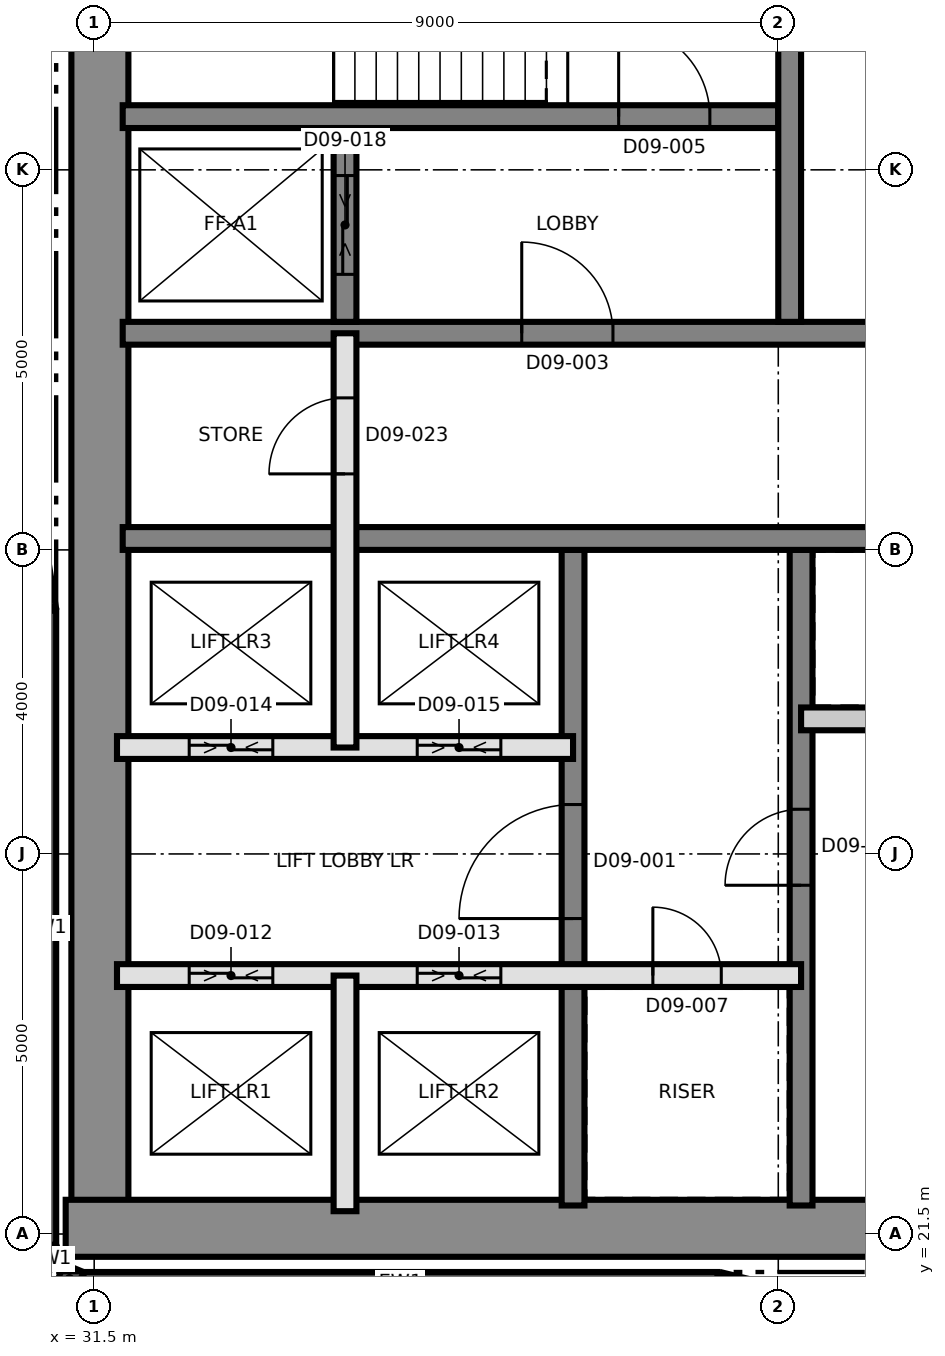
"""IFC4 building model, lengths in metres.
Left out: names, types, materials, properties, quantities, classifications, styles, units other than length and angle.
Written with IfcOpenShell. Run it as: python <this file> out.ifc"""

import sys

from ifc_helpers import new_model, si_unit, direction, frame, frame_2d, origin, place, context, subcontext, project, spatial, rectangle, extrude, element, fill, save


model = new_model("IFC4")
c1 = context("Model", 3, precision=1e-05, world=origin(), true_north=direction((0.0, 1.0)))
c2 = subcontext(c1, "Body", "Model", "MODEL_VIEW")
j1 = project(units=[si_unit("LENGTHUNIT", "METRE"), si_unit("PLANEANGLEUNIT", "RADIAN")], contexts=[c1])
p1 = place(None, origin())
s1 = spatial("IfcSite", under=j1, at=p1, CompositionType="ELEMENT")
p2 = place(p1, origin())
s2 = spatial("IfcBuilding", under=s1, at=p2, CompositionType="ELEMENT")
p3 = place(p2, frame((0.0, 0.0, 113.0)))
s3 = spatial("IfcBuildingStorey", under=s2, at=p3, CompositionType="ELEMENT", Elevation=113.0)
p4 = place(p3, frame((31.575, 21.875, 0.0), z_axis=(0.0, 0.0, 1.0), x_axis=(0.0, 1.0, 0.0)))
e1 = element("IfcWall", 1, at=p4, inside=s3, PredefinedType="SHEAR", context=c2, shape_type="SweptSolid", body=[
    extrude(rectangle(XDim=17.25, YDim=0.75, at=frame_2d((8.625, 0.0))), origin(), (0.0, 0.0, 1.0), 3.7),
])
p5 = place(p3, frame((31.125, 21.575, 0.0), z_axis=(0.0, 0.0, 1.0), x_axis=(1.0, 0.0, 0.0)))
e2 = element("IfcWall", 2, at=p5, inside=s3, PredefinedType="SHEAR", context=c2, shape_type="SweptSolid", body=[
    extrude(rectangle(XDim=27.0, YDim=0.75, at=frame_2d((13.5, 0.0))), origin(), (0.0, 0.0, 1.0), 3.7),
])
p6 = place(p3, frame((37.8, 21.875, 0.0), z_axis=(0.0, 0.0, 1.0), x_axis=(0.0, 1.0, 0.0)))
e3 = element("IfcWall", 3, at=p6, inside=s3, PredefinedType="SHEAR", context=c2, shape_type="SweptSolid", body=[
    extrude(rectangle(XDim=8.625, YDim=0.3, at=frame_2d((4.312, 0.0))), origin(), (0.0, 0.0, 1.0), 3.7),
])
p7 = place(p6, frame((3.775, 0.0, 0.0)))
e4 = element("IfcOpeningElement", 4, at=p7, cuts=e3, PredefinedType="OPENING", context=c2, shape_type="SweptSolid", body=[
    extrude(rectangle(XDim=1.5, YDim=2.1, at=frame_2d((0.75, 1.05))), frame((0.0, 0.16, 0.0), z_axis=(0.0, -1.0, 0.0), x_axis=(1.0, 0.0, 0.0)), (0.0, 0.0, 1.0), 0.32),
])
p8 = place(p3, frame((40.8, 21.875, 0.0), z_axis=(0.0, 0.0, 1.0), x_axis=(0.0, 1.0, 0.0)))
e5 = element("IfcWall", 5, at=p8, inside=s3, PredefinedType="SHEAR", context=c2, shape_type="SweptSolid", body=[
    extrude(rectangle(XDim=8.625, YDim=0.3, at=frame_2d((4.312, 0.0))), origin(), (0.0, 0.0, 1.0), 3.7),
])
p9 = place(p8, frame((4.213, 0.0, 0.0)))
e6 = element("IfcOpeningElement", 6, at=p9, cuts=e5, PredefinedType="OPENING", context=c2, shape_type="SweptSolid", body=[
    extrude(rectangle(XDim=1.0, YDim=2.1, at=frame_2d((0.5, 1.05))), frame((0.0, 0.16, 0.0), z_axis=(0.0, -1.0, 0.0), x_axis=(1.0, 0.0, 0.0)), (0.0, 0.0, 1.0), 0.32),
])
p10 = place(p3, frame((31.875, 30.65, 0.0), z_axis=(0.0, 0.0, 1.0), x_axis=(1.0, 0.0, 0.0)))
e7 = element("IfcWall", 7, at=p10, inside=s3, PredefinedType="SHEAR", context=c2, shape_type="SweptSolid", body=[
    extrude(rectangle(XDim=26.25, YDim=0.3, at=frame_2d((13.125, 0.0))), origin(), (0.0, 0.0, 1.0), 3.7),
])
p11 = place(p10, frame((24.625, 0.0, 0.0)))
e8 = element("IfcOpeningElement", 8, at=p11, cuts=e7, PredefinedType="OPENING", context=c2, shape_type="SweptSolid", body=[
    extrude(rectangle(XDim=1.0, YDim=2.1, at=frame_2d((0.5, 1.05))), frame((0.0, 0.16, 0.0), z_axis=(0.0, -1.0, 0.0), x_axis=(1.0, 0.0, 0.0)), (0.0, 0.0, 1.0), 0.32),
])
p12 = place(p10, frame((11.425, 0.0, 0.0)))
e9 = element("IfcOpeningElement", 9, at=p12, cuts=e7, PredefinedType="OPENING", context=c2, shape_type="SweptSolid", body=[
    extrude(rectangle(XDim=1.0, YDim=2.1, at=frame_2d((0.5, 1.05))), frame((0.0, 0.16, 0.0), z_axis=(0.0, -1.0, 0.0), x_axis=(1.0, 0.0, 0.0)), (0.0, 0.0, 1.0), 0.32),
])
p13 = place(p3, frame((31.875, 33.35, 0.0), z_axis=(0.0, 0.0, 1.0), x_axis=(1.0, 0.0, 0.0)))
e10 = element("IfcWall", 10, at=p13, inside=s3, PredefinedType="SHEAR", context=c2, shape_type="SweptSolid", body=[
    extrude(rectangle(XDim=26.25, YDim=0.3, at=frame_2d((13.125, 0.0))), origin(), (0.0, 0.0, 1.0), 3.7),
])
p14 = place(p13, frame((13.775, 0.0, 0.0)))
e11 = element("IfcOpeningElement", 11, at=p14, cuts=e10, PredefinedType="OPENING", context=c2, shape_type="SweptSolid", body=[
    extrude(rectangle(XDim=1.4, YDim=2.1, at=frame_2d((0.7, 1.05))), frame((0.0, 0.16, 0.0), z_axis=(0.0, -1.0, 0.0), x_axis=(1.0, 0.0, 0.0)), (0.0, 0.0, 1.0), 0.32),
])
p15 = place(p13, frame((5.25, 0.0, 0.0)))
e12 = element("IfcOpeningElement", 12, at=p15, cuts=e10, PredefinedType="OPENING", context=c2, shape_type="SweptSolid", body=[
    extrude(rectangle(XDim=1.2, YDim=2.1, at=frame_2d((0.6, 1.05))), frame((0.0, 0.16, 0.0), z_axis=(0.0, -1.0, 0.0), x_axis=(1.0, 0.0, 0.0)), (0.0, 0.0, 1.0), 0.32),
])
p16 = place(p13, frame((19.8, 0.0, 0.0)))
e13 = element("IfcOpeningElement", 13, at=p16, cuts=e10, PredefinedType="OPENING", context=c2, shape_type="SweptSolid", body=[
    extrude(rectangle(XDim=1.2, YDim=2.1, at=frame_2d((0.6, 1.05))), frame((0.0, 0.16, 0.0), z_axis=(0.0, -1.0, 0.0), x_axis=(1.0, 0.0, 0.0)), (0.0, 0.0, 1.0), 0.32),
])
p17 = place(p3, frame((31.875, 36.2, 0.0), z_axis=(0.0, 0.0, 1.0), x_axis=(1.0, 0.0, 0.0)))
e14 = element("IfcWall", 14, at=p17, inside=s3, PredefinedType="SHEAR", context=c2, shape_type="SweptSolid", body=[
    extrude(rectangle(XDim=8.625, YDim=0.3, at=frame_2d((4.312, 0.0))), origin(), (0.0, 0.0, 1.0), 3.7),
])
p18 = place(p17, frame((6.525, 0.0, 0.0)))
e15 = element("IfcOpeningElement", 15, at=p18, cuts=e14, PredefinedType="OPENING", context=c2, shape_type="SweptSolid", body=[
    extrude(rectangle(XDim=1.2, YDim=2.1, at=frame_2d((0.6, 1.05))), frame((0.0, 0.16, 0.0), z_axis=(0.0, -1.0, 0.0), x_axis=(1.0, 0.0, 0.0)), (0.0, 0.0, 1.0), 0.32),
])
p19 = place(p3, frame((40.65, 33.5, 0.0), z_axis=(0.0, 0.0, 1.0), x_axis=(0.0, 1.0, 0.0)))
e16 = element("IfcWall", 16, at=p19, inside=s3, PredefinedType="SHEAR", context=c2, shape_type="SweptSolid", body=[
    extrude(rectangle(XDim=5.625, YDim=0.3, at=frame_2d((2.812, 0.0))), origin(), (0.0, 0.0, 1.0), 3.7),
])
p20 = place(p3, frame((34.8, 33.5, 0.0), z_axis=(0.0, 0.0, 1.0), x_axis=(0.0, 1.0, 0.0)))
e17 = element("IfcWall", 17, at=p20, inside=s3, PredefinedType="SHEAR", context=c2, shape_type="SweptSolid", body=[
    extrude(rectangle(XDim=2.55, YDim=0.3, at=frame_2d((1.275, 0.0))), origin(), (0.0, 0.0, 1.0), 3.7),
])
p21 = place(p20, frame((0.625, 0.0, 0.0)))
e18 = element("IfcOpeningElement", 18, at=p21, cuts=e17, PredefinedType="OPENING", context=c2, shape_type="SweptSolid", body=[
    extrude(rectangle(XDim=1.3, YDim=2.4, at=frame_2d((0.65, 1.2))), frame((0.0, 0.16, 0.0), z_axis=(0.0, -1.0, 0.0), x_axis=(1.0, 0.0, 0.0)), (0.0, 0.0, 1.0), 0.32),
])
p22 = place(p3, frame((30.85, 29.699, 0.0), z_axis=(0.0, 0.0, 1.0), x_axis=(0.0, -1.0, 0.0)))
e19 = element("IfcWall", 19, at=p22, inside=s3, PredefinedType="SOLIDWALL", context=c2, shape_type="SweptSolid", body=[
    extrude(rectangle(XDim=8.34, YDim=0.3, at=frame_2d((4.17, 0.0))), origin(), (0.0, 0.0, 1.0), 3.4),
])
for number, where, z_axis, x_axis in (
    (20, (30.861, 21.302, 0.0), (0.0, 0.0, 1.0), (0.383, -0.924, 0.0)),
    (21, (31.048, 20.967, 0.0), (0.0, 0.0, 1.0), (0.924, -0.383, 0.0)),
):
    element("IfcWall", number, at=place(p3, frame(where, z_axis=z_axis, x_axis=x_axis)), inside=s3, PredefinedType="SOLIDWALL", context=c2, shape_type="SweptSolid", body=[
        extrude(rectangle(XDim=0.275, YDim=0.3, at=frame_2d((0.138, 0.0))), origin(), (0.0, 0.0, 1.0), 3.4),
    ])
p23 = place(p3, frame((31.36, 20.85, 0.0), z_axis=(0.0, 0.0, 1.0), x_axis=(1.0, 0.0, 0.0)))
e22 = element("IfcWall", 22, at=p23, inside=s3, PredefinedType="SOLIDWALL", context=c2, shape_type="SweptSolid", body=[
    extrude(rectangle(XDim=8.34, YDim=0.3, at=frame_2d((4.17, 0.0))), origin(), (0.0, 0.0, 1.0), 3.4),
])
p24 = place(p3, frame((39.735, 20.846, 0.0), z_axis=(0.0, 0.0, 1.0), x_axis=(0.97206095595, -0.234728562212, 0.0)))
e23 = element("IfcWall", 23, at=p24, inside=s3, PredefinedType="SOLIDWALL", context=c2, shape_type="SweptSolid", body=[
    extrude(rectangle(XDim=2.35, YDim=0.3, at=frame_2d((1.175, 0.0))), origin(), (0.0, 0.0, 1.0), 3.4),
])
p25 = place(p3, frame((30.152, 34.0, 0.0), z_axis=(0.0, 0.0, 1.0), x_axis=(0.160697303067, -0.987003736967, 0.0)))
e24 = element("IfcWall", 24, at=p25, inside=s3, PredefinedType="SOLIDWALL", context=c2, shape_type="SweptSolid", body=[
    extrude(rectangle(XDim=4.333, YDim=0.3, at=frame_2d((2.167, 0.0))), origin(), (0.0, 0.0, 1.0), 3.4),
])
p26 = place(p25, frame((0.366, 0.0, 0.9)))
e25 = element("IfcOpeningElement", 25, at=p26, cuts=e24, PredefinedType="OPENING", context=c2, shape_type="SweptSolid", body=[
    extrude(rectangle(XDim=3.6, YDim=1.5, at=frame_2d((1.8, 0.75))), frame((0.0, 0.16, 0.0), z_axis=(0.0, -1.0, 0.0), x_axis=(1.0, 0.0, 0.0)), (0.0, 0.0, 1.0), 0.32),
])
p27 = place(p3, frame((31.8, 24.9, 0.0), z_axis=(0.0, 0.0, 1.0), x_axis=(1.0, 0.0, 0.0)))
e26 = element("IfcWall", 26, at=p27, inside=s3, PredefinedType="SOLIDWALL", context=c2, shape_type="SweptSolid", body=[
    extrude(rectangle(XDim=9.0, YDim=0.3, at=frame_2d((4.5, 0.0))), origin(), (0.0, 0.0, 1.0), 3.4),
])
p28 = place(p27, frame((7.05, 0.0, 0.0)))
e27 = element("IfcOpeningElement", 27, at=p28, cuts=e26, PredefinedType="OPENING", context=c2, shape_type="SweptSolid", body=[
    extrude(rectangle(XDim=0.9, YDim=2.1, at=frame_2d((0.45, 1.05))), frame((0.0, 0.16, 0.0), z_axis=(0.0, -1.0, 0.0), x_axis=(1.0, 0.0, 0.0)), (0.0, 0.0, 1.0), 0.32),
])
p29 = place(p27, frame((0.95, 0.0, 0.0)))
e28 = element("IfcOpeningElement", 28, at=p29, cuts=e26, PredefinedType="OPENING", context=c2, shape_type="SweptSolid", body=[
    extrude(rectangle(XDim=1.1, YDim=2.4, at=frame_2d((0.55, 1.2))), frame((0.0, 0.16, 0.0), z_axis=(0.0, -1.0, 0.0), x_axis=(1.0, 0.0, 0.0)), (0.0, 0.0, 1.0), 0.32),
])
p30 = place(p27, frame((3.95, 0.0, 0.0)))
e29 = element("IfcOpeningElement", 29, at=p30, cuts=e26, PredefinedType="OPENING", context=c2, shape_type="SweptSolid", body=[
    extrude(rectangle(XDim=1.1, YDim=2.4, at=frame_2d((0.55, 1.2))), frame((0.0, 0.16, 0.0), z_axis=(0.0, -1.0, 0.0), x_axis=(1.0, 0.0, 0.0)), (0.0, 0.0, 1.0), 0.32),
])
p31 = place(p3, frame((31.8, 27.9, 0.0), z_axis=(0.0, 0.0, 1.0), x_axis=(1.0, 0.0, 0.0)))
e30 = element("IfcWall", 30, at=p31, inside=s3, PredefinedType="SOLIDWALL", context=c2, shape_type="SweptSolid", body=[
    extrude(rectangle(XDim=6.0, YDim=0.3, at=frame_2d((3.0, 0.0))), origin(), (0.0, 0.0, 1.0), 3.4),
])
p32 = place(p31, frame((0.95, 0.0, 0.0)))
e31 = element("IfcOpeningElement", 31, at=p32, cuts=e30, PredefinedType="OPENING", context=c2, shape_type="SweptSolid", body=[
    extrude(rectangle(XDim=1.1, YDim=2.4, at=frame_2d((0.55, 1.2))), frame((0.0, 0.16, 0.0), z_axis=(0.0, -1.0, 0.0), x_axis=(1.0, 0.0, 0.0)), (0.0, 0.0, 1.0), 0.32),
])
p33 = place(p31, frame((3.95, 0.0, 0.0)))
e32 = element("IfcOpeningElement", 32, at=p33, cuts=e30, PredefinedType="OPENING", context=c2, shape_type="SweptSolid", body=[
    extrude(rectangle(XDim=1.1, YDim=2.4, at=frame_2d((0.55, 1.2))), frame((0.0, 0.16, 0.0), z_axis=(0.0, -1.0, 0.0), x_axis=(1.0, 0.0, 0.0)), (0.0, 0.0, 1.0), 0.32),
])
p34 = place(p3, frame((40.8, 28.277, 0.0), z_axis=(0.0, 0.0, 1.0), x_axis=(1.0, 0.0, 0.0)))
e33 = element("IfcWall", 33, at=p34, inside=s3, PredefinedType="PARTITIONING", context=c2, shape_type="SweptSolid", body=[
    extrude(rectangle(XDim=6.0, YDim=0.3, at=frame_2d((3.0, 0.0))), origin(), (0.0, 0.0, 1.0), 3.4),
])
p35 = place(p3, frame((34.8, 21.8, 0.0), z_axis=(0.0, 0.0, 1.0), x_axis=(0.0, 1.0, 0.0)))
e34 = element("IfcWall", 34, at=p35, inside=s3, PredefinedType="SOLIDWALL", context=c2, shape_type="SweptSolid", body=[
    extrude(rectangle(XDim=3.1, YDim=0.3, at=frame_2d((1.55, 0.0))), origin(), (0.0, 0.0, 1.0), 3.4),
])
p36 = place(p3, frame((34.8, 27.9, 0.0), z_axis=(0.0, 0.0, 1.0), x_axis=(0.0, 1.0, 0.0)))
e35 = element("IfcWall", 35, at=p36, inside=s3, PredefinedType="SOLIDWALL", context=c2, shape_type="SweptSolid", body=[
    extrude(rectangle(XDim=5.45, YDim=0.3, at=frame_2d((2.725, 0.0))), origin(), (0.0, 0.0, 1.0), 3.4),
])
p37 = place(p36, frame((3.6, 0.0, 0.0)))
e36 = element("IfcOpeningElement", 36, at=p37, cuts=e35, PredefinedType="OPENING", context=c2, shape_type="SweptSolid", body=[
    extrude(rectangle(XDim=1.0, YDim=2.1, at=frame_2d((0.5, 1.05))), frame((0.0, 0.16, 0.0), z_axis=(0.0, -1.0, 0.0), x_axis=(1.0, 0.0, 0.0)), (0.0, 0.0, 1.0), 0.32),
])
p38 = place(p7, origin())
e37 = element("IfcDoor", 37, at=p38, inside=s3, OperationType="SINGLE_SWING_LEFT", PredefinedType="DOOR", context=c2, shape_type="SweptSolid", body=[
    extrude(rectangle(XDim=1.5, YDim=2.1, at=frame_2d((0.75, 1.05))), frame((0.0, 0.025, 0.0), z_axis=(0.0, -1.0, 0.0), x_axis=(1.0, 0.0, 0.0)), (0.0, 0.0, 1.0), 0.05),
])
fill(e4, e37)
p39 = place(p15, origin())
e38 = element("IfcDoor", 38, at=p39, inside=s3, OperationType="SINGLE_SWING_LEFT", PredefinedType="DOOR", context=c2, shape_type="SweptSolid", body=[
    extrude(rectangle(XDim=1.2, YDim=2.1, at=frame_2d((0.6, 1.05))), frame((0.0, 0.025, 0.0), z_axis=(0.0, -1.0, 0.0), x_axis=(1.0, 0.0, 0.0)), (0.0, 0.0, 1.0), 0.05),
])
fill(e12, e38)
p40 = place(p18, origin())
e39 = element("IfcDoor", 39, at=p40, inside=s3, OperationType="SINGLE_SWING_RIGHT", PredefinedType="DOOR", context=c2, shape_type="SweptSolid", body=[
    extrude(rectangle(XDim=1.2, YDim=2.1, at=frame_2d((0.6, 1.05))), frame((0.0, 0.025, 0.0), z_axis=(0.0, -1.0, 0.0), x_axis=(1.0, 0.0, 0.0)), (0.0, 0.0, 1.0), 0.05),
])
fill(e15, e39)
p41 = place(p28, origin())
e40 = element("IfcDoor", 40, at=p41, inside=s3, OperationType="SINGLE_SWING_LEFT", PredefinedType="DOOR", context=c2, shape_type="SweptSolid", body=[
    extrude(rectangle(XDim=0.9, YDim=2.1, at=frame_2d((0.45, 1.05))), frame((0.0, 0.025, 0.0), z_axis=(0.0, -1.0, 0.0), x_axis=(1.0, 0.0, 0.0)), (0.0, 0.0, 1.0), 0.05),
])
fill(e27, e40)
p42 = place(p29, origin())
e41 = element("IfcDoor", 41, at=p42, inside=s3, OperationType="SLIDING_TO_LEFT", PredefinedType="DOOR", context=c2, shape_type="SweptSolid", body=[
    extrude(rectangle(XDim=1.1, YDim=2.4, at=frame_2d((0.55, 1.2))), frame((0.0, 0.025, 0.0), z_axis=(0.0, -1.0, 0.0), x_axis=(1.0, 0.0, 0.0)), (0.0, 0.0, 1.0), 0.05),
])
fill(e28, e41)
p43 = place(p30, origin())
e42 = element("IfcDoor", 42, at=p43, inside=s3, OperationType="SLIDING_TO_LEFT", PredefinedType="DOOR", context=c2, shape_type="SweptSolid", body=[
    extrude(rectangle(XDim=1.1, YDim=2.4, at=frame_2d((0.55, 1.2))), frame((0.0, 0.025, 0.0), z_axis=(0.0, -1.0, 0.0), x_axis=(1.0, 0.0, 0.0)), (0.0, 0.0, 1.0), 0.05),
])
fill(e29, e42)
p44 = place(p32, origin())
e43 = element("IfcDoor", 43, at=p44, inside=s3, OperationType="SLIDING_TO_LEFT", PredefinedType="DOOR", context=c2, shape_type="SweptSolid", body=[
    extrude(rectangle(XDim=1.1, YDim=2.4, at=frame_2d((0.55, 1.2))), frame((0.0, 0.025, 0.0), z_axis=(0.0, -1.0, 0.0), x_axis=(1.0, 0.0, 0.0)), (0.0, 0.0, 1.0), 0.05),
])
fill(e31, e43)
p45 = place(p33, origin())
e44 = element("IfcDoor", 44, at=p45, inside=s3, OperationType="SLIDING_TO_LEFT", PredefinedType="DOOR", context=c2, shape_type="SweptSolid", body=[
    extrude(rectangle(XDim=1.1, YDim=2.4, at=frame_2d((0.55, 1.2))), frame((0.0, 0.025, 0.0), z_axis=(0.0, -1.0, 0.0), x_axis=(1.0, 0.0, 0.0)), (0.0, 0.0, 1.0), 0.05),
])
fill(e32, e44)
p46 = place(p21, origin())
e45 = element("IfcDoor", 45, at=p46, inside=s3, OperationType="SLIDING_TO_LEFT", PredefinedType="DOOR", context=c2, shape_type="SweptSolid", body=[
    extrude(rectangle(XDim=1.3, YDim=2.4, at=frame_2d((0.65, 1.2))), frame((0.0, 0.025, 0.0), z_axis=(0.0, -1.0, 0.0), x_axis=(1.0, 0.0, 0.0)), (0.0, 0.0, 1.0), 0.05),
])
fill(e18, e45)
p47 = place(p9, origin())
e46 = element("IfcDoor", 46, at=p47, inside=s3, OperationType="SINGLE_SWING_RIGHT", PredefinedType="DOOR", context=c2, shape_type="SweptSolid", body=[
    extrude(rectangle(XDim=1.0, YDim=2.1, at=frame_2d((0.5, 1.05))), frame((0.0, 0.025, 0.0), z_axis=(0.0, -1.0, 0.0), x_axis=(1.0, 0.0, 0.0)), (0.0, 0.0, 1.0), 0.05),
])
fill(e6, e46)
p48 = place(p37, origin())
e47 = element("IfcDoor", 47, at=p48, inside=s3, OperationType="SINGLE_SWING_RIGHT", PredefinedType="DOOR", context=c2, shape_type="SweptSolid", body=[
    extrude(rectangle(XDim=1.0, YDim=2.1, at=frame_2d((0.5, 1.05))), frame((0.0, 0.025, 0.0), z_axis=(0.0, -1.0, 0.0), x_axis=(1.0, 0.0, 0.0)), (0.0, 0.0, 1.0), 0.05),
])
fill(e36, e47)
save(model, sys.argv[1])
